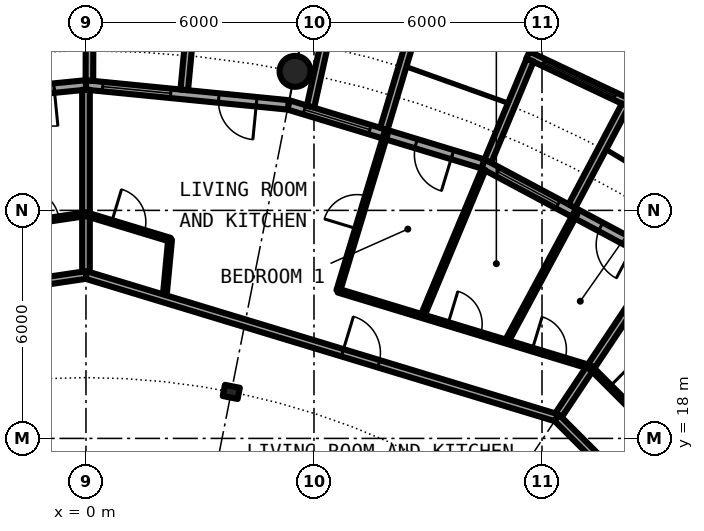
"""IFC4 building model, lengths in metres.
Left out: names, types, materials, properties, quantities, classifications, styles, units other than length and angle.
Written with IfcOpenShell. Run it as: python <this file> out.ifc"""

import sys

from ifc_helpers import new_model, si_unit, direction, frame, frame_2d, origin, origin_2d, place, context, subcontext, project, spatial, rectangle, circle, hollow_circle, i_section, extrude, element, fill, save


model = new_model("IFC4")
c1 = context("Model", 3, precision=1e-05, world=origin(), true_north=direction((0.0, 1.0)))
c2 = subcontext(c1, "Body", "Model", "MODEL_VIEW")
j1 = project(units=[si_unit("LENGTHUNIT", "METRE"), si_unit("PLANEANGLEUNIT", "RADIAN")], contexts=[c1])
p1 = place(None, origin())
s1 = spatial("IfcSite", under=j1, at=p1, CompositionType="ELEMENT")
p2 = place(p1, origin())
s2 = spatial("IfcBuilding", under=s1, at=p2, CompositionType="ELEMENT")
p3 = place(p2, frame((0.0, 0.0, 218.8)))
s3 = spatial("IfcBuildingStorey", under=s2, at=p3, CompositionType="ELEMENT", Elevation=218.8)
p4 = place(p3, frame((5.501, 27.658, 0.0), z_axis=(0.0, 0.0, 1.0), x_axis=(1.0, 0.0, 0.0)))
e1 = element("IfcColumn", 1, at=p4, inside=s3, PredefinedType="COLUMN", context=c2, shape_type="SweptSolid", body=[
    extrude(hollow_circle(Radius=0.406, WallThickness=0.03, at=origin_2d()), origin(), (0.0, 0.0, 1.0), 3.05),
])
p5 = place(p3, frame((3.824, 19.223, 0.0), z_axis=(0.0, 0.0, 1.0), x_axis=(0.195090322016, 0.980785280403, 0.0)))
e2 = element("IfcColumn", 2, at=p5, inside=s3, PredefinedType="COLUMN", context=c2, shape_type="SweptSolid", body=[
    extrude(i_section(OverallWidth=0.3, OverallDepth=0.4, WebThickness=0.013, FlangeThickness=0.024, FilletRadius=0.027, at=origin_2d()), origin(), (0.0, 0.0, 1.0), 3.05),
])
p6 = place(p3, frame((15.167, 22.699, 0.0), z_axis=(0.0, 0.0, 1.0), x_axis=(-0.881915646801, 0.471407246368, 0.0)))
e3 = element("IfcWall", 3, at=p6, inside=s3, PredefinedType="SOLIDWALL", context=c2, shape_type="SweptSolid", body=[
    extrude(rectangle(XDim=5.352, YDim=0.25, at=frame_2d((2.676, 0.0))), origin(), (0.0, 0.0, 1.0), 2.65),
])
p7 = place(p6, frame((0.841, 0.0, 0.0)))
e4 = element("IfcOpeningElement", 4, at=p7, cuts=e3, PredefinedType="OPENING", context=c2, shape_type="SweptSolid", body=[
    extrude(rectangle(XDim=1.0, YDim=2.2, at=frame_2d((0.5, 1.1))), frame((0.0, 0.135, 0.0), z_axis=(0.0, -1.0, 0.0), x_axis=(1.0, 0.0, 0.0)), (0.0, 0.0, 1.0), 0.27),
])
p8 = place(p6, frame((3.111, 0.0, 0.3)))
e5 = element("IfcOpeningElement", 5, at=p8, cuts=e3, PredefinedType="OPENING", context=c2, shape_type="SweptSolid", body=[
    extrude(rectangle(XDim=1.8, YDim=2.1, at=frame_2d((0.9, 1.05))), frame((0.0, 0.135, 0.0), z_axis=(0.0, -1.0, 0.0), x_axis=(1.0, 0.0, 0.0)), (0.0, 0.0, 1.0), 0.27),
])
p9 = place(p3, frame((14.335, 26.808, -0.03), z_axis=(0.0, 0.0, 1.0), x_axis=(-0.904000060331, 0.427532327342, 0.0)))
e6 = element("IfcWall", 6, at=p9, inside=s3, PredefinedType="SOLIDWALL", context=c2, shape_type="SweptSolid", body=[
    extrude(rectangle(XDim=2.993, YDim=0.2, at=frame_2d((1.497, 0.0))), origin(), (0.0, 0.0, 1.0), 2.68),
])
p10 = place(p9, frame((0.457, 0.0, 0.33)))
e7 = element("IfcOpeningElement", 7, at=p10, cuts=e6, PredefinedType="OPENING", context=c2, shape_type="SweptSolid", body=[
    extrude(circle(Radius=1.04, at=frame_2d((1.04, 1.04))), frame((0.0, 0.11, 0.0), z_axis=(0.0, -1.0, 0.0), x_axis=(1.0, 0.0, 0.0)), (0.0, 0.0, 1.0), 0.22),
])
p11 = place(p3, frame((12.787, 24.113, -0.03), z_axis=(0.0, 0.0, 1.0), x_axis=(0.468365282436, 0.883534924159, 0.0)))
e8 = element("IfcWall", 8, at=p11, inside=s3, PredefinedType="SOLIDWALL", context=c2, shape_type="SweptSolid", body=[
    extrude(rectangle(XDim=3.006, YDim=0.2, at=frame_2d((1.503, 0.0))), origin(), (0.0, 0.0, 1.0), 2.68),
])
p12 = place(p3, frame((10.575, 25.295, -0.03), z_axis=(0.0, 0.0, 1.0), x_axis=(0.385697364644, 0.922625353492, 0.0)))
e9 = element("IfcWall", 9, at=p12, inside=s3, PredefinedType="SOLIDWALL", context=c2, shape_type="SweptSolid", body=[
    extrude(rectangle(XDim=2.883, YDim=0.2, at=frame_2d((1.442, 0.0))), origin(), (0.0, 0.0, 1.0), 2.68),
])
p13 = place(p3, frame((10.447, 25.222, 0.0), z_axis=(0.0, 0.0, 1.0), x_axis=(-0.956965678721, 0.290201119486, 0.0)))
e10 = element("IfcWall", 10, at=p13, inside=s3, PredefinedType="SOLIDWALL", context=c2, shape_type="SweptSolid", body=[
    extrude(rectangle(XDim=5.351, YDim=0.25, at=frame_2d((2.676, 0.0))), origin(), (0.0, 0.0, 1.0), 2.65),
])
p14 = place(p13, frame((0.841, 0.0, 0.0)))
e11 = element("IfcOpeningElement", 11, at=p14, cuts=e10, PredefinedType="OPENING", context=c2, shape_type="SweptSolid", body=[
    extrude(rectangle(XDim=1.0, YDim=2.2, at=frame_2d((0.5, 1.1))), frame((0.0, 0.135, 0.0), z_axis=(0.0, -1.0, 0.0), x_axis=(1.0, 0.0, 0.0)), (0.0, 0.0, 1.0), 0.27),
])
p15 = place(p13, frame((3.111, 0.0, 0.3)))
e12 = element("IfcOpeningElement", 12, at=p15, cuts=e10, PredefinedType="OPENING", context=c2, shape_type="SweptSolid", body=[
    extrude(rectangle(XDim=1.8, YDim=2.1, at=frame_2d((0.9, 1.05))), frame((0.0, 0.135, 0.0), z_axis=(0.0, -1.0, 0.0), x_axis=(1.0, 0.0, 0.0)), (0.0, 0.0, 1.0), 0.27),
])
p16 = place(p3, frame((7.837, 26.144, -0.03), z_axis=(0.0, 0.0, 1.0), x_axis=(0.287064767992, 0.957911174889, 0.0)))
e13 = element("IfcWall", 13, at=p16, inside=s3, PredefinedType="SOLIDWALL", context=c2, shape_type="SweptSolid", body=[
    extrude(rectangle(XDim=3.006, YDim=0.2, at=frame_2d((1.503, 0.0))), origin(), (0.0, 0.0, 1.0), 2.68),
])
p17 = place(p3, frame((5.909, 26.729, -0.03), z_axis=(0.0, 0.0, 1.0), x_axis=(0.216409053917, 0.976302781612, 0.0)))
e14 = element("IfcWall", 14, at=p17, inside=s3, PredefinedType="SOLIDWALL", context=c2, shape_type="SweptSolid", body=[
    extrude(rectangle(XDim=2.925, YDim=0.2, at=frame_2d((1.463, 0.0))), origin(), (0.0, 0.0, 1.0), 2.68),
])
p18 = place(p3, frame((5.326, 26.775, 0.0), z_axis=(0.0, 0.0, 1.0), x_axis=(-0.995173996315, 0.098126026407, 0.0)))
e15 = element("IfcWall", 15, at=p18, inside=s3, PredefinedType="SOLIDWALL", context=c2, shape_type="SweptSolid", body=[
    extrude(rectangle(XDim=5.352, YDim=0.25, at=frame_2d((2.676, 0.0))), origin(), (0.0, 0.0, 1.0), 2.65),
])
p19 = place(p18, frame((0.841, 0.0, 0.0)))
e16 = element("IfcOpeningElement", 16, at=p19, cuts=e15, PredefinedType="OPENING", context=c2, shape_type="SweptSolid", body=[
    extrude(rectangle(XDim=1.0, YDim=2.2, at=frame_2d((0.5, 1.1))), frame((0.0, 0.135, 0.0), z_axis=(0.0, -1.0, 0.0), x_axis=(1.0, 0.0, 0.0)), (0.0, 0.0, 1.0), 0.27),
])
p20 = place(p18, frame((3.111, 0.0, 0.3)))
e17 = element("IfcOpeningElement", 17, at=p20, cuts=e15, PredefinedType="OPENING", context=c2, shape_type="SweptSolid", body=[
    extrude(rectangle(XDim=1.8, YDim=2.1, at=frame_2d((0.9, 1.05))), frame((0.0, 0.135, 0.0), z_axis=(0.0, -1.0, 0.0), x_axis=(1.0, 0.0, 0.0)), (0.0, 0.0, 1.0), 0.27),
])
p21 = place(p3, frame((2.586, 27.171, -0.03), z_axis=(0.0, 0.0, 1.0), x_axis=(0.094548432284, 0.995520262954, 0.0)))
e18 = element("IfcWall", 18, at=p21, inside=s3, PredefinedType="SOLIDWALL", context=c2, shape_type="SweptSolid", body=[
    extrude(rectangle(XDim=3.006, YDim=0.2, at=frame_2d((1.503, 0.0))), origin(), (0.0, 0.0, 1.0), 2.68),
])
p22 = place(p3, frame((0.09, 27.417, -0.03), z_axis=(0.0, 0.0, 1.0), x_axis=(0.00347308367, 0.999993968827, 0.0)))
e19 = element("IfcWall", 19, at=p22, inside=s3, PredefinedType="SOLIDWALL", context=c2, shape_type="SweptSolid", body=[
    extrude(rectangle(XDim=2.882, YDim=0.2, at=frame_2d((1.441, 0.0))), origin(), (0.0, 0.0, 1.0), 2.68),
])
p23 = place(p3, frame((0.0, 27.3, 0.0), z_axis=(0.0, 0.0, 1.0), x_axis=(-0.995173996315, -0.098126026407, 0.0)))
e20 = element("IfcWall", 20, at=p23, inside=s3, PredefinedType="SOLIDWALL", context=c2, shape_type="SweptSolid", body=[
    extrude(rectangle(XDim=5.352, YDim=0.25, at=frame_2d((2.676, 0.0))), origin(), (0.0, 0.0, 1.0), 2.65),
])
p24 = place(p23, frame((0.841, 0.0, 0.0)))
e21 = element("IfcOpeningElement", 21, at=p24, cuts=e20, PredefinedType="OPENING", context=c2, shape_type="SweptSolid", body=[
    extrude(rectangle(XDim=1.0, YDim=2.2, at=frame_2d((0.5, 1.1))), frame((0.0, 0.135, 0.0), z_axis=(0.0, -1.0, 0.0), x_axis=(1.0, 0.0, 0.0)), (0.0, 0.0, 1.0), 0.27),
])
p25 = place(p23, frame((3.111, 0.0, 0.3)))
e22 = element("IfcOpeningElement", 22, at=p25, cuts=e20, PredefinedType="OPENING", context=c2, shape_type="SweptSolid", body=[
    extrude(rectangle(XDim=1.8, YDim=2.1, at=frame_2d((0.9, 1.05))), frame((0.0, 0.135, 0.0), z_axis=(0.0, -1.0, 0.0), x_axis=(1.0, 0.0, 0.0)), (0.0, 0.0, 1.0), 0.27),
])
p26 = place(p3, frame((0.0, 22.3, 0.0), z_axis=(0.0, 0.0, 1.0), x_axis=(0.0, 1.0, 0.0)))
e23 = element("IfcWall", 23, at=p26, inside=s3, PredefinedType="PARTITIONING", context=c2, shape_type="SweptSolid", body=[
    extrude(rectangle(XDim=4.875, YDim=0.2, at=frame_2d((2.438, 0.0))), origin(), (0.0, 0.0, 1.0), 2.65),
])
p27 = place(p3, frame((2.065, 21.674, 0.0), z_axis=(0.0, 0.0, 1.0), x_axis=(0.094720578196, 0.995503898569, 0.0)))
e24 = element("IfcWall", 24, at=p27, inside=s3, PredefinedType="PARTITIONING", context=c2, shape_type="SweptSolid", body=[
    extrude(rectangle(XDim=1.562, YDim=0.1, at=frame_2d((0.781, 0.0))), origin(), (0.0, 0.0, 1.0), 2.65),
])
p28 = place(p3, frame((6.639, 21.886, 0.0), z_axis=(0.0, 0.0, 1.0), x_axis=(0.290193157742, 0.956968093094, 0.0)))
e25 = element("IfcWall", 25, at=p28, inside=s3, PredefinedType="PARTITIONING", context=c2, shape_type="SweptSolid", body=[
    extrude(rectangle(XDim=4.304, YDim=0.1, at=frame_2d((2.152, 0.0))), origin(), (0.0, 0.0, 1.0), 2.65),
])
p29 = place(p28, frame((1.702, 0.0, 0.0)))
e26 = element("IfcOpeningElement", 26, at=p29, cuts=e25, PredefinedType="OPENING", context=c2, shape_type="SweptSolid", body=[
    extrude(rectangle(XDim=0.9, YDim=2.3, at=frame_2d((0.45, 1.15))), frame((0.0, 0.06, 0.0), z_axis=(0.0, -1.0, 0.0), x_axis=(1.0, 0.0, 0.0)), (0.0, 0.0, 1.0), 0.12),
])
p30 = place(p3, frame((8.852, 21.215, 0.0), z_axis=(0.0, 0.0, 1.0), x_axis=(0.385232176411, 0.922819684585, 0.0)))
e27 = element("IfcWall", 27, at=p30, inside=s3, PredefinedType="PARTITIONING", context=c2, shape_type="SweptSolid", body=[
    extrude(rectangle(XDim=4.187, YDim=0.1, at=frame_2d((2.094, 0.0))), origin(), (0.0, 0.0, 1.0), 2.65),
])
p31 = place(p3, frame((11.065, 20.543, 0.0), z_axis=(0.0, 0.0, 1.0), x_axis=(0.474281720599, 0.88037313084, 0.0)))
e28 = element("IfcWall", 28, at=p31, inside=s3, PredefinedType="PARTITIONING", context=c2, shape_type="SweptSolid", body=[
    extrude(rectangle(XDim=3.842, YDim=0.1, at=frame_2d((1.921, 0.0))), origin(), (0.0, 0.0, 1.0), 2.65),
])
p32 = place(p3, frame((12.389, 18.542, 0.0), z_axis=(0.0, 0.0, 1.0), x_axis=(0.555462686211, 0.831541462723, 0.0)))
e29 = element("IfcWall", 29, at=p32, inside=s3, PredefinedType="PARTITIONING", context=c2, shape_type="SweptSolid", body=[
    extrude(rectangle(XDim=4.875, YDim=0.2, at=frame_2d((2.438, 0.0))), origin(), (0.0, 0.0, 1.0), 2.65),
])
p33 = place(p3, frame((13.927, 17.004, 0.0), z_axis=(0.0, 0.0, 1.0), x_axis=(0.633861186344, 0.773446828454, 0.0)))
e30 = element("IfcWall", 30, at=p33, inside=s3, PredefinedType="PARTITIONING", context=c2, shape_type="SweptSolid", body=[
    extrude(rectangle(XDim=1.578, YDim=0.1, at=frame_2d((0.789, 0.0))), origin(), (0.0, 0.0, 1.0), 2.65),
])
p34 = place(p3, frame((0.0, 22.3, 0.0), z_axis=(0.0, 0.0, 1.0), x_axis=(0.956942051091, -0.290279022415, 0.0)))
e31 = element("IfcWall", 31, at=p34, inside=s3, PredefinedType="PARTITIONING", context=c2, shape_type="SweptSolid", body=[
    extrude(rectangle(XDim=12.946, YDim=0.2, at=frame_2d((6.473, 0.0))), origin(), (0.0, 0.0, 1.0), 2.65),
])
p35 = place(p34, frame((7.052, 0.0, 0.0)))
e32 = element("IfcOpeningElement", 32, at=p35, cuts=e31, PredefinedType="OPENING", context=c2, shape_type="SweptSolid", body=[
    extrude(rectangle(XDim=1.0, YDim=2.3, at=frame_2d((0.5, 1.15))), frame((0.0, 0.11, 0.0), z_axis=(0.0, -1.0, 0.0), x_axis=(1.0, 0.0, 0.0)), (0.0, 0.0, 1.0), 0.22),
])
p36 = place(p3, frame((12.389, 18.542, 0.0), z_axis=(0.0, 0.0, 1.0), x_axis=(0.707106781187, -0.707106781187, 0.0)))
e33 = element("IfcWall", 33, at=p36, inside=s3, PredefinedType="PARTITIONING", context=c2, shape_type="SweptSolid", body=[
    extrude(rectangle(XDim=8.702, YDim=0.2, at=frame_2d((4.351, 0.0))), origin(), (0.0, 0.0, 1.0), 2.65),
])
p37 = place(p36, frame((4.938, 0.0, 0.0)))
e34 = element("IfcOpeningElement", 34, at=p37, cuts=e33, PredefinedType="OPENING", context=c2, shape_type="SweptSolid", body=[
    extrude(rectangle(XDim=1.0, YDim=2.3, at=frame_2d((0.5, 1.15))), frame((0.0, 0.11, 0.0), z_axis=(0.0, -1.0, 0.0), x_axis=(1.0, 0.0, 0.0)), (0.0, 0.0, 1.0), 0.22),
])
p38 = place(p3, frame((-6.473, 21.34, 0.0), z_axis=(0.0, 0.0, 1.0), x_axis=(0.989181015112, 0.146700100005, 0.0)))
e35 = element("IfcWall", 35, at=p38, inside=s3, PredefinedType="PARTITIONING", context=c2, shape_type="SweptSolid", body=[
    extrude(rectangle(XDim=6.544, YDim=0.2, at=frame_2d((3.272, 0.0))), origin(), (0.0, 0.0, 1.0), 2.65),
])
p39 = place(p38, frame((1.681, 0.0, 0.0)))
e36 = element("IfcOpeningElement", 36, at=p39, cuts=e35, PredefinedType="OPENING", context=c2, shape_type="SweptSolid", body=[
    extrude(rectangle(XDim=1.0, YDim=2.3, at=frame_2d((0.5, 1.15))), frame((0.0, 0.11, 0.0), z_axis=(0.0, -1.0, 0.0), x_axis=(1.0, 0.0, 0.0)), (0.0, 0.0, 1.0), 0.22),
])
p40 = place(p3, frame((0.003, 23.899, 0.0), z_axis=(0.0, 0.0, 1.0), x_axis=(0.956994210955, -0.29010701508, 0.0)))
e37 = element("IfcWall", 37, at=p40, inside=s3, PredefinedType="PARTITIONING", context=c2, shape_type="SweptSolid", body=[
    extrude(rectangle(XDim=2.312, YDim=0.1, at=frame_2d((1.156, 0.0))), origin(), (0.0, 0.0, 1.0), 2.65),
])
p41 = place(p40, frame((0.703, 0.0, 0.0)))
e38 = element("IfcOpeningElement", 38, at=p41, cuts=e37, PredefinedType="OPENING", context=c2, shape_type="SweptSolid", body=[
    extrude(rectangle(XDim=0.9, YDim=2.3, at=frame_2d((0.45, 1.15))), frame((0.0, 0.06, 0.0), z_axis=(0.0, -1.0, 0.0), x_axis=(1.0, 0.0, 0.0)), (0.0, 0.0, 1.0), 0.12),
])
p42 = place(p3, frame((6.639, 21.886, 0.0), z_axis=(0.0, 0.0, 1.0), x_axis=(0.956938868877, -0.290289512785, 0.0)))
e39 = element("IfcWall", 39, at=p42, inside=s3, PredefinedType="PARTITIONING", context=c2, shape_type="SweptSolid", body=[
    extrude(rectangle(XDim=6.941, YDim=0.1, at=frame_2d((3.47, 0.0))), origin(), (0.0, 0.0, 1.0), 2.65),
])
p43 = place(p42, frame((3.016, 0.0, 0.0)))
e40 = element("IfcOpeningElement", 40, at=p43, cuts=e39, PredefinedType="OPENING", context=c2, shape_type="SweptSolid", body=[
    extrude(rectangle(XDim=0.9, YDim=2.3, at=frame_2d((0.45, 1.15))), frame((0.0, 0.06, 0.0), z_axis=(0.0, -1.0, 0.0), x_axis=(1.0, 0.0, 0.0)), (0.0, 0.0, 1.0), 0.12),
])
p44 = place(p42, frame((5.333, 0.0, 0.0)))
e41 = element("IfcOpeningElement", 41, at=p44, cuts=e39, PredefinedType="OPENING", context=c2, shape_type="SweptSolid", body=[
    extrude(rectangle(XDim=0.9, YDim=2.3, at=frame_2d((0.45, 1.15))), frame((0.0, 0.06, 0.0), z_axis=(0.0, -1.0, 0.0), x_axis=(1.0, 0.0, 0.0)), (0.0, 0.0, 1.0), 0.12),
])
p45 = place(p3, frame((13.283, 19.867, 0.0), z_axis=(0.0, 0.0, 1.0), x_axis=(0.707106781187, -0.707106781187, 0.0)))
e42 = element("IfcWall", 42, at=p45, inside=s3, PredefinedType="PARTITIONING", context=c2, shape_type="SweptSolid", body=[
    extrude(rectangle(XDim=2.332, YDim=0.1, at=frame_2d((1.166, 0.0))), origin(), (0.0, 0.0, 1.0), 2.65),
])
p46 = place(p45, frame((0.709, 0.0, 0.0)))
e43 = element("IfcOpeningElement", 43, at=p46, cuts=e42, PredefinedType="OPENING", context=c2, shape_type="SweptSolid", body=[
    extrude(rectangle(XDim=0.9, YDim=2.3, at=frame_2d((0.45, 1.15))), frame((0.0, 0.06, 0.0), z_axis=(0.0, -1.0, 0.0), x_axis=(1.0, 0.0, 0.0)), (0.0, 0.0, 1.0), 0.12),
])
p47 = place(p3, frame((-2.313, 23.557, 0.0), z_axis=(0.0, 0.0, 1.0), x_axis=(0.989181588285, 0.146696235121, 0.0)))
e44 = element("IfcWall", 44, at=p47, inside=s3, PredefinedType="PARTITIONING", context=c2, shape_type="SweptSolid", body=[
    extrude(rectangle(XDim=2.338, YDim=0.1, at=frame_2d((1.169, 0.0))), origin(), (0.0, 0.0, 1.0), 2.65),
])
p48 = place(p47, frame((0.719, 0.0, 0.0)))
e45 = element("IfcOpeningElement", 45, at=p48, cuts=e44, PredefinedType="OPENING", context=c2, shape_type="SweptSolid", body=[
    extrude(rectangle(XDim=0.9, YDim=2.3, at=frame_2d((0.45, 1.15))), frame((0.0, 0.06, 0.0), z_axis=(0.0, -1.0, 0.0), x_axis=(1.0, 0.0, 0.0)), (0.0, 0.0, 1.0), 0.12),
])
p49 = place(p7, origin())
e46 = element("IfcDoor", 46, at=p49, inside=s3, OperationType="SINGLE_SWING_LEFT", PredefinedType="DOOR", context=c2, shape_type="SweptSolid", body=[
    extrude(rectangle(XDim=1.0, YDim=2.2, at=frame_2d((0.5, 1.1))), frame((0.0, 0.025, 0.0), z_axis=(0.0, -1.0, 0.0), x_axis=(1.0, 0.0, 0.0)), (0.0, 0.0, 1.0), 0.05),
])
fill(e4, e46)
p50 = place(p8, origin())
e47 = element("IfcWindow", 47, at=p50, inside=s3, PartitioningType="SINGLE_PANEL", PredefinedType="WINDOW", context=c2, shape_type="SweptSolid", body=[
    extrude(rectangle(XDim=1.8, YDim=2.1, at=frame_2d((0.9, 1.05))), frame((0.0, 0.03, 0.0), z_axis=(0.0, -1.0, 0.0), x_axis=(1.0, 0.0, 0.0)), (0.0, 0.0, 1.0), 0.06),
])
fill(e5, e47)
p51 = place(p10, origin())
e48 = element("IfcWindow", 48, at=p51, inside=s3, PartitioningType="SINGLE_PANEL", PredefinedType="WINDOW", context=c2, shape_type="SweptSolid", body=[
    extrude(circle(Radius=1.04, at=frame_2d((1.04, 1.04))), frame((0.0, 0.03, 0.0), z_axis=(0.0, -1.0, 0.0), x_axis=(1.0, 0.0, 0.0)), (0.0, 0.0, 1.0), 0.06),
])
fill(e7, e48)
p52 = place(p14, origin())
e49 = element("IfcDoor", 49, at=p52, inside=s3, OperationType="SINGLE_SWING_LEFT", PredefinedType="DOOR", context=c2, shape_type="SweptSolid", body=[
    extrude(rectangle(XDim=1.0, YDim=2.2, at=frame_2d((0.5, 1.1))), frame((0.0, 0.025, 0.0), z_axis=(0.0, -1.0, 0.0), x_axis=(1.0, 0.0, 0.0)), (0.0, 0.0, 1.0), 0.05),
])
fill(e11, e49)
p53 = place(p15, origin())
e50 = element("IfcWindow", 50, at=p53, inside=s3, PartitioningType="SINGLE_PANEL", PredefinedType="WINDOW", context=c2, shape_type="SweptSolid", body=[
    extrude(rectangle(XDim=1.8, YDim=2.1, at=frame_2d((0.9, 1.05))), frame((0.0, 0.03, 0.0), z_axis=(0.0, -1.0, 0.0), x_axis=(1.0, 0.0, 0.0)), (0.0, 0.0, 1.0), 0.06),
])
fill(e12, e50)
p54 = place(p19, origin())
e51 = element("IfcDoor", 51, at=p54, inside=s3, OperationType="SINGLE_SWING_LEFT", PredefinedType="DOOR", context=c2, shape_type="SweptSolid", body=[
    extrude(rectangle(XDim=1.0, YDim=2.2, at=frame_2d((0.5, 1.1))), frame((0.0, 0.025, 0.0), z_axis=(0.0, -1.0, 0.0), x_axis=(1.0, 0.0, 0.0)), (0.0, 0.0, 1.0), 0.05),
])
fill(e16, e51)
p55 = place(p20, origin())
e52 = element("IfcWindow", 52, at=p55, inside=s3, PartitioningType="SINGLE_PANEL", PredefinedType="WINDOW", context=c2, shape_type="SweptSolid", body=[
    extrude(rectangle(XDim=1.8, YDim=2.1, at=frame_2d((0.9, 1.05))), frame((0.0, 0.03, 0.0), z_axis=(0.0, -1.0, 0.0), x_axis=(1.0, 0.0, 0.0)), (0.0, 0.0, 1.0), 0.06),
])
fill(e17, e52)
p56 = place(p24, origin())
e53 = element("IfcDoor", 53, at=p56, inside=s3, OperationType="SINGLE_SWING_LEFT", PredefinedType="DOOR", context=c2, shape_type="SweptSolid", body=[
    extrude(rectangle(XDim=1.0, YDim=2.2, at=frame_2d((0.5, 1.1))), frame((0.0, 0.025, 0.0), z_axis=(0.0, -1.0, 0.0), x_axis=(1.0, 0.0, 0.0)), (0.0, 0.0, 1.0), 0.05),
])
fill(e21, e53)
p57 = place(p46, origin())
e54 = element("IfcDoor", 54, at=p57, inside=s3, OperationType="SINGLE_SWING_LEFT", PredefinedType="DOOR", context=c2, shape_type="SweptSolid", body=[
    extrude(rectangle(XDim=0.9, YDim=2.3, at=frame_2d((0.45, 1.15))), frame((0.0, 0.025, 0.0), z_axis=(0.0, -1.0, 0.0), x_axis=(1.0, 0.0, 0.0)), (0.0, 0.0, 1.0), 0.05),
])
fill(e43, e54)
p58 = place(p35, origin())
e55 = element("IfcDoor", 55, at=p58, inside=s3, OperationType="SINGLE_SWING_RIGHT", PredefinedType="DOOR", context=c2, shape_type="SweptSolid", body=[
    extrude(rectangle(XDim=1.0, YDim=2.3, at=frame_2d((0.5, 1.15))), frame((0.0, 0.025, 0.0), z_axis=(0.0, -1.0, 0.0), x_axis=(1.0, 0.0, 0.0)), (0.0, 0.0, 1.0), 0.05),
])
fill(e32, e55)
p59 = place(p41, origin())
e56 = element("IfcDoor", 56, at=p59, inside=s3, OperationType="SINGLE_SWING_LEFT", PredefinedType="DOOR", context=c2, shape_type="SweptSolid", body=[
    extrude(rectangle(XDim=0.9, YDim=2.3, at=frame_2d((0.45, 1.15))), frame((0.0, 0.025, 0.0), z_axis=(0.0, -1.0, 0.0), x_axis=(1.0, 0.0, 0.0)), (0.0, 0.0, 1.0), 0.05),
])
fill(e38, e56)
p60 = place(p29, origin())
e57 = element("IfcDoor", 57, at=p60, inside=s3, OperationType="SINGLE_SWING_RIGHT", PredefinedType="DOOR", context=c2, shape_type="SweptSolid", body=[
    extrude(rectangle(XDim=0.9, YDim=2.3, at=frame_2d((0.45, 1.15))), frame((0.0, 0.025, 0.0), z_axis=(0.0, -1.0, 0.0), x_axis=(1.0, 0.0, 0.0)), (0.0, 0.0, 1.0), 0.05),
])
fill(e26, e57)
p61 = place(p43, origin())
e58 = element("IfcDoor", 58, at=p61, inside=s3, OperationType="SINGLE_SWING_LEFT", PredefinedType="DOOR", context=c2, shape_type="SweptSolid", body=[
    extrude(rectangle(XDim=0.9, YDim=2.3, at=frame_2d((0.45, 1.15))), frame((0.0, 0.025, 0.0), z_axis=(0.0, -1.0, 0.0), x_axis=(1.0, 0.0, 0.0)), (0.0, 0.0, 1.0), 0.05),
])
fill(e40, e58)
p62 = place(p44, origin())
e59 = element("IfcDoor", 59, at=p62, inside=s3, OperationType="SINGLE_SWING_RIGHT", PredefinedType="DOOR", context=c2, shape_type="SweptSolid", body=[
    extrude(rectangle(XDim=0.9, YDim=2.3, at=frame_2d((0.45, 1.15))), frame((0.0, 0.025, 0.0), z_axis=(0.0, -1.0, 0.0), x_axis=(1.0, 0.0, 0.0)), (0.0, 0.0, 1.0), 0.05),
])
fill(e41, e59)
p63 = place(p48, origin())
e60 = element("IfcDoor", 60, at=p63, inside=s3, OperationType="SINGLE_SWING_LEFT", PredefinedType="DOOR", context=c2, shape_type="SweptSolid", body=[
    extrude(rectangle(XDim=0.9, YDim=2.3, at=frame_2d((0.45, 1.15))), frame((0.0, 0.025, 0.0), z_axis=(0.0, -1.0, 0.0), x_axis=(1.0, 0.0, 0.0)), (0.0, 0.0, 1.0), 0.05),
])
fill(e45, e60)
save(model, sys.argv[1])
